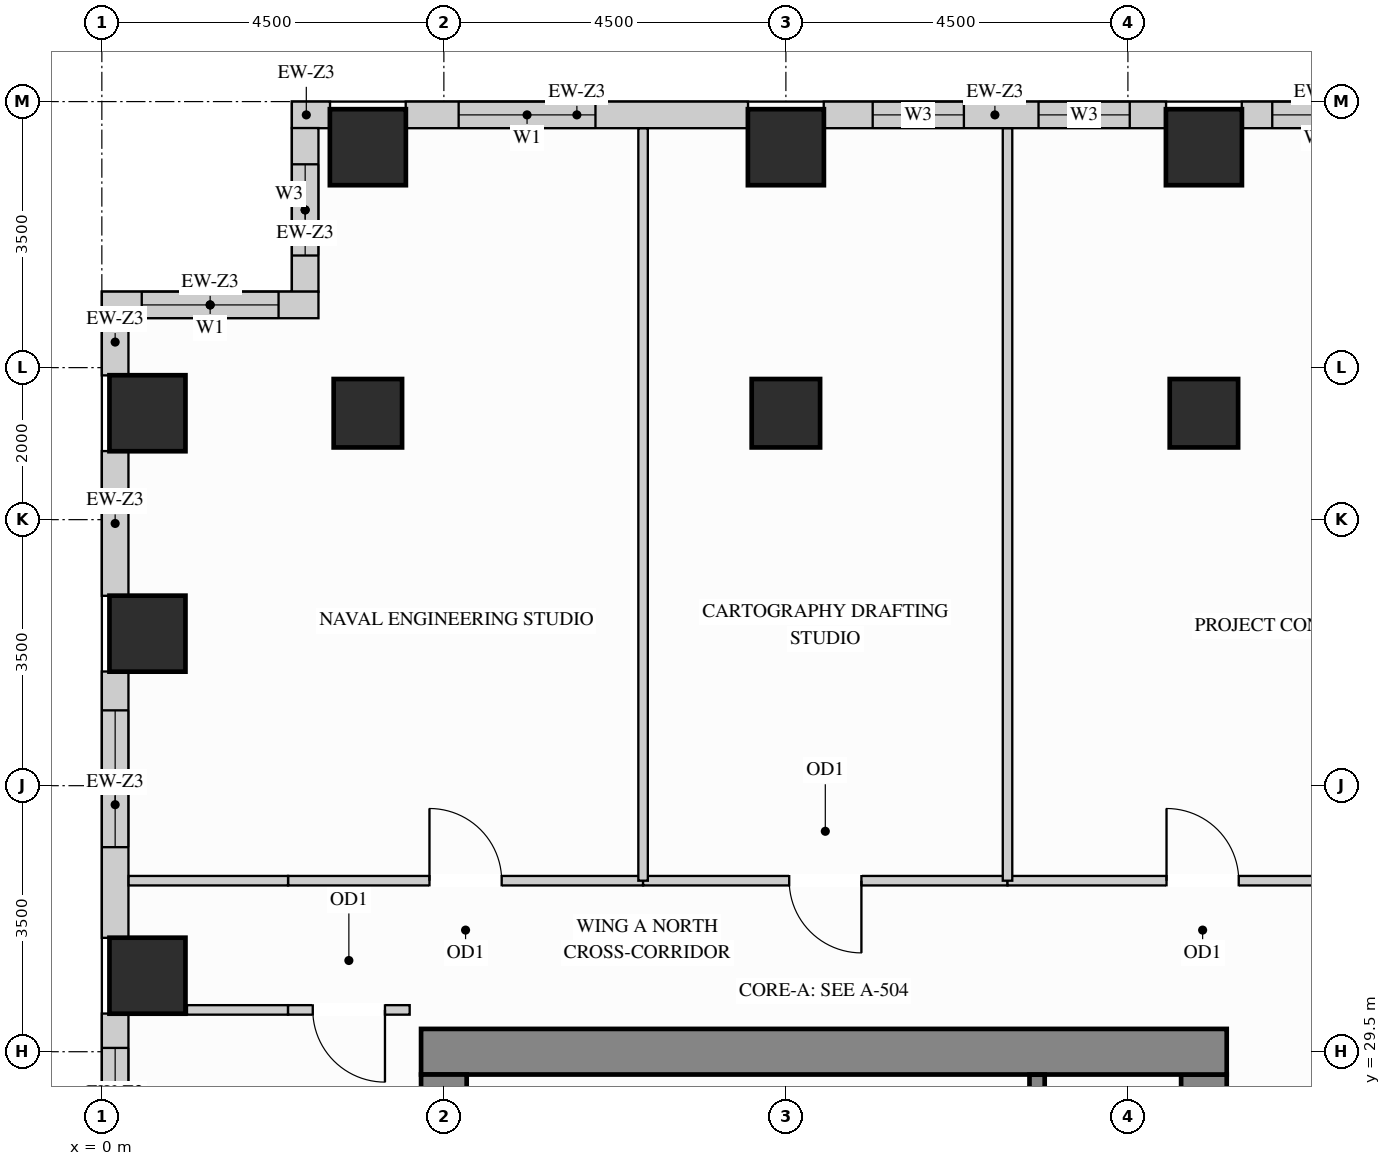
"""IFC4 building model, lengths in metres.
Left out: names, types, materials, properties, quantities, classifications, styles, units other than length and angle.
Written with IfcOpenShell. Run it as: python <this file> out.ifc"""

import sys

from ifc_helpers import new_model, si_unit, direction, frame, frame_2d, origin, origin_2d, place, context, subcontext, project, spatial, rectangle, extrude, source, transform, mapped, element, fill, save


model = new_model("IFC4")
c1 = context("Model", 3, precision=1e-05, world=origin(), true_north=direction((0.0, 1.0)))
c2 = subcontext(c1, "Body", "Model", "MODEL_VIEW")
j1 = project(units=[si_unit("LENGTHUNIT", "METRE"), si_unit("PLANEANGLEUNIT", "RADIAN")], contexts=[c1])
p1 = place(None, origin())
s1 = spatial("IfcSite", under=j1, at=p1, CompositionType="ELEMENT")
p2 = place(p1, origin())
s2 = spatial("IfcBuilding", under=s1, at=p2, CompositionType="ELEMENT")
p3 = place(p2, frame((0.0, 0.0, 175.5)))
s3 = spatial("IfcBuildingStorey", under=s2, at=p3, CompositionType="ELEMENT", Elevation=175.5)
m1 = source(origin(), c2, "Body", "SweptSolid", [
    extrude(rectangle(XDim=0.9, YDim=0.9, at=origin_2d()), origin(), (0.0, 0.0, 1.0), 3.4),
])
for number, where, z_axis, x_axis in (
    (1, (14.5, 37.9, 0.0), (0.0, 0.0, 1.0), (1.0, 0.0, 0.0)),
    (2, (3.5, 37.9, 0.0), (0.0, 0.0, 1.0), (1.0, 0.0, 0.0)),
    (3, (9.0, 37.9, 0.0), (0.0, 0.0, 1.0), (1.0, 0.0, 0.0)),
):
    element("IfcColumn", number, at=place(p3, frame(where, z_axis=z_axis, x_axis=x_axis)), inside=s3, PredefinedType="COLUMN", context=c2, shape_type="MappedRepresentation", body=[
        mapped(m1, transform((0.0, 0.0, 0.0), x_axis=(1.0, 0.0, 0.0), y_axis=(0.0, 1.0, 0.0), z_axis=(0.0, 0.0, 1.0))),
    ])
m2 = source(origin(), c2, "Body", "SweptSolid", [
    extrude(rectangle(XDim=1.0, YDim=1.0, at=origin_2d()), origin(), (0.0, 0.0, 1.0), 3.4),
])
for number, where, z_axis, x_axis in (
    (4, (14.5, 41.4, 0.0), (0.0, 0.0, 1.0), (1.0, 0.0, 0.0)),
    (5, (3.5, 41.4, 0.0), (0.0, 0.0, 1.0), (1.0, 0.0, 0.0)),
    (6, (9.0, 41.4, 0.0), (0.0, 0.0, 1.0), (1.0, 0.0, 0.0)),
    (7, (0.6, 30.5, 0.0), (0.0, 0.0, 1.0), (1.0, 0.0, 0.0)),
    (8, (0.6, 35.0, 0.0), (0.0, 0.0, 1.0), (1.0, 0.0, 0.0)),
    (9, (0.6, 37.9, 0.0), (0.0, 0.0, 1.0), (1.0, 0.0, 0.0)),
):
    element("IfcColumn", number, at=place(p3, frame(where, z_axis=z_axis, x_axis=x_axis)), inside=s3, PredefinedType="COLUMN", context=c2, shape_type="MappedRepresentation", body=[
        mapped(m2, transform((0.0, 0.0, 0.0), x_axis=(1.0, 0.0, 0.0), y_axis=(0.0, 1.0, 0.0), z_axis=(0.0, 0.0, 1.0))),
    ])
m3 = source(origin(), c2, "Body", "SweptSolid", [
    extrude(rectangle(XDim=8.32, YDim=0.6, at=frame_2d((4.16, 0.0))), origin(), (0.0, 0.0, 1.0), 3.4),
])
p4 = place(p3, frame((14.5, 20.88, 0.0), z_axis=(0.0, 0.0, 1.0), x_axis=(0.0, 1.0, 0.0)))
e10 = element("IfcWall", 10, at=p4, inside=s3, PredefinedType="SHEAR", context=c2, shape_type="MappedRepresentation", body=[
    mapped(m3, transform((0.0, 0.0, 0.0), x_axis=(1.0, 0.0, 0.0), y_axis=(0.0, 1.0, 0.0), z_axis=(0.0, 0.0, 1.0))),
])
m4 = source(origin(), c2, "Body", "SweptSolid", [
    extrude(rectangle(XDim=10.6, YDim=0.6, at=frame_2d((5.3, 0.0))), origin(), (0.0, 0.0, 1.0), 3.4),
])
p5 = place(p3, frame((4.2, 29.5, 0.0), z_axis=(0.0, 0.0, 1.0), x_axis=(1.0, 0.0, 0.0)))
e11 = element("IfcWall", 11, at=p5, inside=s3, PredefinedType="SHEAR", context=c2, shape_type="MappedRepresentation", body=[
    mapped(m4, transform((0.0, 0.0, 0.0), x_axis=(1.0, 0.0, 0.0), y_axis=(0.0, 1.0, 0.0), z_axis=(0.0, 0.0, 1.0))),
])
m5 = source(origin(), c2, "Body", "SweptSolid", [
    extrude(rectangle(XDim=20.4, YDim=0.6, at=frame_2d((10.2, 0.0))), origin(), (0.0, 0.0, 1.0), 3.4),
])
p6 = place(p3, frame((4.5, 8.8, 0.0), z_axis=(0.0, 0.0, 1.0), x_axis=(0.0, 1.0, 0.0)))
e12 = element("IfcWall", 12, at=p6, inside=s3, PredefinedType="SHEAR", context=c2, shape_type="MappedRepresentation", body=[
    mapped(m5, transform((0.0, 0.0, 0.0), x_axis=(1.0, 0.0, 0.0), y_axis=(0.0, 1.0, 0.0), z_axis=(0.0, 0.0, 1.0))),
])
p7 = place(p3, frame((17.0, 41.825, 0.0), z_axis=(0.0, 0.0, 1.0), x_axis=(-1.0, 0.0, 0.0)))
e13 = element("IfcWall", 13, at=p7, inside=s3, PredefinedType="SOLIDWALL", context=c2, shape_type="SweptSolid", body=[
    extrude(rectangle(XDim=2.002, YDim=0.35, at=frame_2d((1.001, 0.0))), origin(), (0.0, 0.0, 1.0), 3.385),
])
p8 = place(p7, frame((0.401, 0.0, 0.78)))
e14 = element("IfcOpeningElement", 14, at=p8, cuts=e13, PredefinedType="OPENING", context=c2, shape_type="SweptSolid", body=[
    extrude(rectangle(XDim=1.2, YDim=2.1, at=frame_2d((0.6, 1.05))), frame((0.0, 0.185, 0.0), z_axis=(0.0, -1.0, 0.0), x_axis=(1.0, 0.0, 0.0)), (0.0, 0.0, 1.0), 0.37),
])
p9 = place(p3, frame((14.002, 41.825, 0.0), z_axis=(0.0, 0.0, 1.0), x_axis=(-1.0, 0.0, 0.0)))
e15 = element("IfcWall", 15, at=p9, inside=s3, PredefinedType="SOLIDWALL", context=c2, shape_type="SweptSolid", body=[
    extrude(rectangle(XDim=4.504, YDim=0.35, at=frame_2d((2.252, 0.0))), origin(), (0.0, 0.0, 1.0), 2.612),
])
p10 = place(p9, frame((0.478, 0.0, 0.78)))
e16 = element("IfcOpeningElement", 16, at=p10, cuts=e15, PredefinedType="OPENING", context=c2, shape_type="SweptSolid", body=[
    extrude(rectangle(XDim=1.2, YDim=1.652, at=frame_2d((0.6, 0.826))), frame((0.0, 0.185, 0.0), z_axis=(0.0, -1.0, 0.0), x_axis=(1.0, 0.0, 0.0)), (0.0, 0.0, 1.0), 0.37),
])
p11 = place(p9, frame((2.66, 0.0, 0.78)))
e17 = element("IfcOpeningElement", 17, at=p11, cuts=e15, PredefinedType="OPENING", context=c2, shape_type="SweptSolid", body=[
    extrude(rectangle(XDim=1.2, YDim=1.652, at=frame_2d((0.6, 0.826))), frame((0.0, 0.185, 0.0), z_axis=(0.0, -1.0, 0.0), x_axis=(1.0, 0.0, 0.0)), (0.0, 0.0, 1.0), 0.37),
])
p12 = place(p3, frame((8.502, 41.825, 0.0), z_axis=(0.0, 0.0, 1.0), x_axis=(-1.0, 0.0, 0.0)))
e18 = element("IfcWall", 18, at=p12, inside=s3, PredefinedType="SOLIDWALL", context=c2, shape_type="SweptSolid", body=[
    extrude(rectangle(XDim=4.504, YDim=0.35, at=frame_2d((2.252, 0.0))), origin(), (0.0, 0.0, 1.0), 2.612),
])
p13 = place(p12, frame((2.008, 0.0, 0.78)))
e19 = element("IfcOpeningElement", 19, at=p13, cuts=e18, PredefinedType="OPENING", context=c2, shape_type="SweptSolid", body=[
    extrude(rectangle(XDim=1.8, YDim=1.652, at=frame_2d((0.9, 0.826))), frame((0.0, 0.185, 0.0), z_axis=(0.0, -1.0, 0.0), x_axis=(1.0, 0.0, 0.0)), (0.0, 0.0, 1.0), 0.37),
])
m6 = source(origin(), c2, "Body", "SweptSolid", [
    extrude(rectangle(XDim=0.502, YDim=0.35, at=frame_2d((0.251, 0.0))), origin(), (0.0, 0.0, 1.0), 3.385),
])
p14 = place(p3, frame((3.002, 41.825, 0.0), z_axis=(0.0, 0.0, 1.0), x_axis=(-1.0, 0.0, 0.0)))
e20 = element("IfcWall", 20, at=p14, inside=s3, PredefinedType="SOLIDWALL", context=c2, shape_type="MappedRepresentation", body=[
    mapped(m6, transform((0.0, 0.0, 0.0), x_axis=(1.0, 0.0, 0.0), y_axis=(0.0, 1.0, 0.0), z_axis=(0.0, 0.0, 1.0))),
])
p15 = place(p3, frame((2.675, 41.652, 0.0), z_axis=(0.0, 0.0, 1.0), x_axis=(0.0, -1.0, 0.0)))
e21 = element("IfcWall", 21, at=p15, inside=s3, PredefinedType="SOLIDWALL", context=c2, shape_type="SweptSolid", body=[
    extrude(rectangle(XDim=2.154, YDim=0.35, at=frame_2d((1.077, 0.0))), origin(), (0.0, 0.0, 1.0), 3.385),
])
p16 = place(p15, frame((0.477, 0.0, 0.78)))
e22 = element("IfcOpeningElement", 22, at=p16, cuts=e21, PredefinedType="OPENING", context=c2, shape_type="SweptSolid", body=[
    extrude(rectangle(XDim=1.2, YDim=2.1, at=frame_2d((0.6, 1.05))), frame((0.0, 0.185, 0.0), z_axis=(0.0, -1.0, 0.0), x_axis=(1.0, 0.0, 0.0)), (0.0, 0.0, 1.0), 0.37),
])
p17 = place(p3, frame((2.85, 39.325, 0.0), z_axis=(0.0, 0.0, 1.0), x_axis=(-1.0, 0.0, 0.0)))
e23 = element("IfcWall", 23, at=p17, inside=s3, PredefinedType="SOLIDWALL", context=c2, shape_type="SweptSolid", body=[
    extrude(rectangle(XDim=2.85, YDim=0.35, at=frame_2d((1.425, 0.0))), origin(), (0.0, 0.0, 1.0), 3.385),
])
p18 = place(p17, frame((0.525, 0.0, 0.78)))
e24 = element("IfcOpeningElement", 24, at=p18, cuts=e23, PredefinedType="OPENING", context=c2, shape_type="SweptSolid", body=[
    extrude(rectangle(XDim=1.8, YDim=2.1, at=frame_2d((0.9, 1.05))), frame((0.0, 0.185, 0.0), z_axis=(0.0, -1.0, 0.0), x_axis=(1.0, 0.0, 0.0)), (0.0, 0.0, 1.0), 0.37),
])
m7 = source(origin(), c2, "Body", "SweptSolid", [
    extrude(rectangle(XDim=0.754, YDim=0.35, at=frame_2d((0.377, 0.0))), origin(), (0.0, 0.0, 1.0), 3.385),
])
p19 = place(p3, frame((0.175, 39.152, 0.0), z_axis=(0.0, 0.0, 1.0), x_axis=(0.0, -1.0, 0.0)))
e25 = element("IfcWall", 25, at=p19, inside=s3, PredefinedType="SOLIDWALL", context=c2, shape_type="MappedRepresentation", body=[
    mapped(m7, transform((0.0, 0.0, 0.0), x_axis=(1.0, 0.0, 0.0), y_axis=(0.0, 1.0, 0.0), z_axis=(0.0, 0.0, 1.0))),
])
m8 = source(origin(), c2, "Body", "SweptSolid", [
    extrude(rectangle(XDim=1.904, YDim=0.35, at=frame_2d((0.952, 0.0))), origin(), (0.0, 0.0, 1.0), 2.612),
])
p20 = place(p3, frame((0.175, 37.402, 0.0), z_axis=(0.0, 0.0, 1.0), x_axis=(0.0, -1.0, 0.0)))
e26 = element("IfcWall", 26, at=p20, inside=s3, PredefinedType="SOLIDWALL", context=c2, shape_type="MappedRepresentation", body=[
    mapped(m8, transform((0.0, 0.0, 0.0), x_axis=(1.0, 0.0, 0.0), y_axis=(0.0, 1.0, 0.0), z_axis=(0.0, 0.0, 1.0))),
])
p21 = place(p3, frame((0.175, 34.502, 0.0), z_axis=(0.0, 0.0, 1.0), x_axis=(0.0, -1.0, 0.0)))
e27 = element("IfcWall", 27, at=p21, inside=s3, PredefinedType="SOLIDWALL", context=c2, shape_type="SweptSolid", body=[
    extrude(rectangle(XDim=3.504, YDim=0.35, at=frame_2d((1.752, 0.0))), origin(), (0.0, 0.0, 1.0), 2.612),
])
p22 = place(p21, frame((0.511, 0.0, 0.78)))
e28 = element("IfcOpeningElement", 28, at=p22, cuts=e27, PredefinedType="OPENING", context=c2, shape_type="SweptSolid", body=[
    extrude(rectangle(XDim=1.8, YDim=1.652, at=frame_2d((0.9, 0.826))), frame((0.0, 0.185, 0.0), z_axis=(0.0, -1.0, 0.0), x_axis=(1.0, 0.0, 0.0)), (0.0, 0.0, 1.0), 0.37),
])
p23 = place(p3, frame((0.175, 30.002, 0.0), z_axis=(0.0, 0.0, 1.0), x_axis=(0.0, -1.0, 0.0)))
e29 = element("IfcWall", 29, at=p23, inside=s3, PredefinedType="SOLIDWALL", context=c2, shape_type="SweptSolid", body=[
    extrude(rectangle(XDim=2.704, YDim=0.35, at=frame_2d((1.352, 0.0))), origin(), (0.0, 0.0, 1.0), 2.612),
])
p24 = place(p23, frame((0.452, 0.0, 0.78)))
e30 = element("IfcOpeningElement", 30, at=p24, cuts=e29, PredefinedType="OPENING", context=c2, shape_type="SweptSolid", body=[
    extrude(rectangle(XDim=1.8, YDim=1.652, at=frame_2d((0.9, 0.826))), frame((0.0, 0.185, 0.0), z_axis=(0.0, -1.0, 0.0), x_axis=(1.0, 0.0, 0.0)), (0.0, 0.0, 1.0), 0.37),
])
p25 = place(p3, frame((2.45, 31.75, 0.0), z_axis=(0.0, 0.0, 1.0), x_axis=(1.0, 0.0, 0.0)))
e31 = element("IfcWall", 31, at=p25, inside=s3, PredefinedType="PARTITIONING", context=c2, shape_type="SweptSolid", body=[
    extrude(rectangle(XDim=4.671, YDim=0.125, at=frame_2d((2.335, 0.0))), origin(), (0.0, 0.0, 1.0), 2.848),
])
p26 = place(p25, frame((1.861, 0.0, 0.0)))
e32 = element("IfcOpeningElement", 32, at=p26, cuts=e31, PredefinedType="OPENING", context=c2, shape_type="SweptSolid", body=[
    extrude(rectangle(XDim=0.95, YDim=2.15, at=frame_2d((0.475, 1.075))), frame((0.0, 0.073, 0.0), z_axis=(0.0, -1.0, 0.0), x_axis=(1.0, 0.0, 0.0)), (0.0, 0.0, 1.0), 0.145),
])
p27 = place(p3, frame((7.121, 31.75, 0.0), z_axis=(0.0, 0.0, 1.0), x_axis=(1.0, 0.0, 0.0)))
e33 = element("IfcWall", 33, at=p27, inside=s3, PredefinedType="PARTITIONING", context=c2, shape_type="SweptSolid", body=[
    extrude(rectangle(XDim=4.795, YDim=0.125, at=frame_2d((2.397, 0.0))), origin(), (0.0, 0.0, 1.0), 2.848),
])
p28 = place(p27, frame((1.923, 0.0, 0.0)))
e34 = element("IfcOpeningElement", 34, at=p28, cuts=e33, PredefinedType="OPENING", context=c2, shape_type="SweptSolid", body=[
    extrude(rectangle(XDim=0.95, YDim=2.15, at=frame_2d((0.475, 1.075))), frame((0.0, 0.073, 0.0), z_axis=(0.0, -1.0, 0.0), x_axis=(1.0, 0.0, 0.0)), (0.0, 0.0, 1.0), 0.145),
])
p29 = place(p3, frame((11.916, 31.75, 0.0), z_axis=(0.0, 0.0, 1.0), x_axis=(1.0, 0.0, 0.0)))
e35 = element("IfcWall", 35, at=p29, inside=s3, PredefinedType="PARTITIONING", context=c2, shape_type="SweptSolid", body=[
    extrude(rectangle(XDim=5.134, YDim=0.125, at=frame_2d((2.567, 0.0))), origin(), (0.0, 0.0, 1.0), 2.848),
])
p30 = place(p29, frame((2.092, 0.0, 0.0)))
e36 = element("IfcOpeningElement", 36, at=p30, cuts=e35, PredefinedType="OPENING", context=c2, shape_type="SweptSolid", body=[
    extrude(rectangle(XDim=0.95, YDim=2.15, at=frame_2d((0.475, 1.075))), frame((0.0, 0.073, 0.0), z_axis=(0.0, -1.0, 0.0), x_axis=(1.0, 0.0, 0.0)), (0.0, 0.0, 1.0), 0.145),
])
m9 = source(origin(), c2, "Body", "SweptSolid", [
    extrude(rectangle(XDim=2.098, YDim=0.125, at=frame_2d((1.049, 0.0))), origin(), (0.0, 0.0, 1.0), 2.848),
])
p31 = place(p3, frame((0.352, 31.75, 0.0), z_axis=(0.0, 0.0, 1.0), x_axis=(1.0, 0.0, 0.0)))
e37 = element("IfcWall", 37, at=p31, inside=s3, PredefinedType="PARTITIONING", context=c2, shape_type="MappedRepresentation", body=[
    mapped(m9, transform((0.0, 0.0, 0.0), x_axis=(1.0, 0.0, 0.0), y_axis=(0.0, 1.0, 0.0), z_axis=(0.0, 0.0, 1.0))),
])
m10 = source(origin(), c2, "Body", "SweptSolid", [
    extrude(rectangle(XDim=9.898, YDim=0.125, at=frame_2d((4.949, 0.0))), origin(), (0.0, 0.0, 1.0), 3.385),
])
for number, where, z_axis, x_axis in (
    (38, (7.121, 31.75, 0.0), (0.0, 0.0, 1.0), (0.0, 1.0, 0.0)),
    (39, (11.916, 31.75, 0.0), (0.0, 0.0, 1.0), (0.0, 1.0, 0.0)),
):
    element("IfcWall", number, at=place(p3, frame(where, z_axis=z_axis, x_axis=x_axis)), inside=s3, PredefinedType="PARTITIONING", context=c2, shape_type="MappedRepresentation", body=[
        mapped(m10, transform((0.0, 0.0, 0.0), x_axis=(1.0, 0.0, 0.0), y_axis=(0.0, 1.0, 0.0), z_axis=(0.0, 0.0, 1.0))),
    ])
m11 = source(origin(), c2, "Body", "SweptSolid", [
    extrude(rectangle(XDim=1.33, YDim=0.125, at=frame_2d((0.665, 0.0))), origin(), (0.0, 0.0, 1.0), 3.385),
])
p32 = place(p3, frame((1.12, 30.05, 0.0), z_axis=(0.0, 0.0, 1.0), x_axis=(1.0, 0.0, 0.0)))
e40 = element("IfcWall", 40, at=p32, inside=s3, PredefinedType="PARTITIONING", context=c2, shape_type="MappedRepresentation", body=[
    mapped(m11, transform((0.0, 0.0, 0.0), x_axis=(1.0, 0.0, 0.0), y_axis=(0.0, 1.0, 0.0), z_axis=(0.0, 0.0, 1.0))),
])
p33 = place(p3, frame((2.45, 30.05, 0.0), z_axis=(0.0, 0.0, 1.0), x_axis=(1.0, 0.0, 0.0)))
e41 = element("IfcWall", 41, at=p33, inside=s3, PredefinedType="PARTITIONING", context=c2, shape_type="SweptSolid", body=[
    extrude(rectangle(XDim=1.6, YDim=0.125, at=frame_2d((0.8, 0.0))), origin(), (0.0, 0.0, 1.0), 3.385),
])
p34 = place(p33, frame((0.325, 0.0, 0.0)))
e42 = element("IfcOpeningElement", 42, at=p34, cuts=e41, PredefinedType="OPENING", context=c2, shape_type="SweptSolid", body=[
    extrude(rectangle(XDim=0.95, YDim=2.15, at=frame_2d((0.475, 1.075))), frame((0.0, 0.073, 0.0), z_axis=(0.0, -1.0, 0.0), x_axis=(1.0, 0.0, 0.0)), (0.0, 0.0, 1.0), 0.145),
])
m12 = source(origin(), c2, "Body", "SweptSolid", [
    extrude(rectangle(XDim=3.753, YDim=0.2, at=frame_2d((1.876, 0.0))), origin(), (0.0, 0.0, 1.0), 3.4),
])
p35 = place(p3, frame((12.305, 25.445, 0.0), z_axis=(0.0, 0.0, 1.0), x_axis=(0.0, 1.0, 0.0)))
e43 = element("IfcWall", 43, at=p35, inside=s3, PredefinedType="SHEAR", context=c2, shape_type="MappedRepresentation", body=[
    mapped(m12, transform((0.0, 0.0, 0.0), x_axis=(1.0, 0.0, 0.0), y_axis=(0.0, 1.0, 0.0), z_axis=(0.0, 0.0, 1.0))),
])
m13 = source(origin(), c2, "Body", "SweptSolid", [
    extrude(rectangle(XDim=0.95, YDim=2.15, at=frame_2d((0.475, 1.075))), frame((0.0, 0.025, 0.0), z_axis=(0.0, -1.0, 0.0), x_axis=(1.0, 0.0, 0.0)), (0.0, 0.0, 1.0), 0.05),
])
p36 = place(p26, origin())
e44 = element("IfcDoor", 44, at=p36, inside=s3, OperationType="SINGLE_SWING_LEFT", PredefinedType="DOOR", context=c2, shape_type="MappedRepresentation", body=[
    mapped(m13, transform((0.0, 0.0, 0.0), x_axis=(1.0, 0.0, 0.0), y_axis=(0.0, 1.0, 0.0), z_axis=(0.0, 0.0, 1.0))),
])
fill(e32, e44)
p37 = place(p28, origin())
e45 = element("IfcDoor", 45, at=p37, inside=s3, OperationType="SINGLE_SWING_RIGHT", PredefinedType="DOOR", context=c2, shape_type="MappedRepresentation", body=[
    mapped(m13, transform((0.0, 0.0, 0.0), x_axis=(1.0, 0.0, 0.0), y_axis=(0.0, 1.0, 0.0), z_axis=(0.0, 0.0, 1.0))),
])
fill(e34, e45)
p38 = place(p30, origin())
e46 = element("IfcDoor", 46, at=p38, inside=s3, OperationType="SINGLE_SWING_LEFT", PredefinedType="DOOR", context=c2, shape_type="MappedRepresentation", body=[
    mapped(m13, transform((0.0, 0.0, 0.0), x_axis=(1.0, 0.0, 0.0), y_axis=(0.0, 1.0, 0.0), z_axis=(0.0, 0.0, 1.0))),
])
fill(e36, e46)
p39 = place(p34, origin())
e47 = element("IfcDoor", 47, at=p39, inside=s3, OperationType="SINGLE_SWING_RIGHT", PredefinedType="DOOR", context=c2, shape_type="MappedRepresentation", body=[
    mapped(m13, transform((0.0, 0.0, 0.0), x_axis=(1.0, 0.0, 0.0), y_axis=(0.0, 1.0, 0.0), z_axis=(0.0, 0.0, 1.0))),
])
fill(e42, e47)
m14 = source(origin(), c2, "Body", "SweptSolid", [
    extrude(rectangle(XDim=1.8, YDim=1.652, at=frame_2d((0.9, 0.826))), frame((0.0, 0.03, 0.0), z_axis=(0.0, -1.0, 0.0), x_axis=(1.0, 0.0, 0.0)), (0.0, 0.0, 1.0), 0.06),
])
p40 = place(p13, origin())
e48 = element("IfcWindow", 48, at=p40, inside=s3, PartitioningType="SINGLE_PANEL", PredefinedType="WINDOW", context=c2, shape_type="MappedRepresentation", body=[
    mapped(m14, transform((0.0, 0.0, 0.0), x_axis=(1.0, 0.0, 0.0), y_axis=(0.0, 1.0, 0.0), z_axis=(0.0, 0.0, 1.0))),
])
fill(e19, e48)
m15 = source(origin(), c2, "Body", "SweptSolid", [
    extrude(rectangle(XDim=1.8, YDim=2.1, at=frame_2d((0.9, 1.05))), frame((0.0, 0.03, 0.0), z_axis=(0.0, -1.0, 0.0), x_axis=(1.0, 0.0, 0.0)), (0.0, 0.0, 1.0), 0.06),
])
p41 = place(p18, origin())
e49 = element("IfcWindow", 49, at=p41, inside=s3, PartitioningType="SINGLE_PANEL", PredefinedType="WINDOW", context=c2, shape_type="MappedRepresentation", body=[
    mapped(m15, transform((0.0, 0.0, 0.0), x_axis=(1.0, 0.0, 0.0), y_axis=(0.0, 1.0, 0.0), z_axis=(0.0, 0.0, 1.0))),
])
fill(e24, e49)
p42 = place(p22, origin())
e50 = element("IfcWindow", 50, at=p42, inside=s3, PartitioningType="SINGLE_PANEL", PredefinedType="WINDOW", context=c2, shape_type="MappedRepresentation", body=[
    mapped(m14, transform((0.0, 0.0, 0.0), x_axis=(1.0, 0.0, 0.0), y_axis=(0.0, 1.0, 0.0), z_axis=(0.0, 0.0, 1.0))),
])
fill(e28, e50)
p43 = place(p24, origin())
e51 = element("IfcWindow", 51, at=p43, inside=s3, PartitioningType="SINGLE_PANEL", PredefinedType="WINDOW", context=c2, shape_type="MappedRepresentation", body=[
    mapped(m14, transform((0.0, 0.0, 0.0), x_axis=(1.0, 0.0, 0.0), y_axis=(0.0, 1.0, 0.0), z_axis=(0.0, 0.0, 1.0))),
])
fill(e30, e51)
m16 = source(origin(), c2, "Body", "SweptSolid", [
    extrude(rectangle(XDim=1.2, YDim=2.1, at=frame_2d((0.6, 1.05))), frame((0.0, 0.03, 0.0), z_axis=(0.0, -1.0, 0.0), x_axis=(1.0, 0.0, 0.0)), (0.0, 0.0, 1.0), 0.06),
])
p44 = place(p8, origin())
e52 = element("IfcWindow", 52, at=p44, inside=s3, PartitioningType="SINGLE_PANEL", PredefinedType="WINDOW", context=c2, shape_type="MappedRepresentation", body=[
    mapped(m16, transform((0.0, 0.0, 0.0), x_axis=(1.0, 0.0, 0.0), y_axis=(0.0, 1.0, 0.0), z_axis=(0.0, 0.0, 1.0))),
])
fill(e14, e52)
m17 = source(origin(), c2, "Body", "SweptSolid", [
    extrude(rectangle(XDim=1.2, YDim=1.652, at=frame_2d((0.6, 0.826))), frame((0.0, 0.03, 0.0), z_axis=(0.0, -1.0, 0.0), x_axis=(1.0, 0.0, 0.0)), (0.0, 0.0, 1.0), 0.06),
])
p45 = place(p10, origin())
e53 = element("IfcWindow", 53, at=p45, inside=s3, PartitioningType="SINGLE_PANEL", PredefinedType="WINDOW", context=c2, shape_type="MappedRepresentation", body=[
    mapped(m17, transform((0.0, 0.0, 0.0), x_axis=(1.0, 0.0, 0.0), y_axis=(0.0, 1.0, 0.0), z_axis=(0.0, 0.0, 1.0))),
])
fill(e16, e53)
p46 = place(p11, origin())
e54 = element("IfcWindow", 54, at=p46, inside=s3, PartitioningType="SINGLE_PANEL", PredefinedType="WINDOW", context=c2, shape_type="MappedRepresentation", body=[
    mapped(m17, transform((0.0, 0.0, 0.0), x_axis=(1.0, 0.0, 0.0), y_axis=(0.0, 1.0, 0.0), z_axis=(0.0, 0.0, 1.0))),
])
fill(e17, e54)
p47 = place(p16, origin())
e55 = element("IfcWindow", 55, at=p47, inside=s3, PartitioningType="SINGLE_PANEL", PredefinedType="WINDOW", context=c2, shape_type="MappedRepresentation", body=[
    mapped(m16, transform((0.0, 0.0, 0.0), x_axis=(1.0, 0.0, 0.0), y_axis=(0.0, 1.0, 0.0), z_axis=(0.0, 0.0, 1.0))),
])
fill(e22, e55)
save(model, sys.argv[1])
